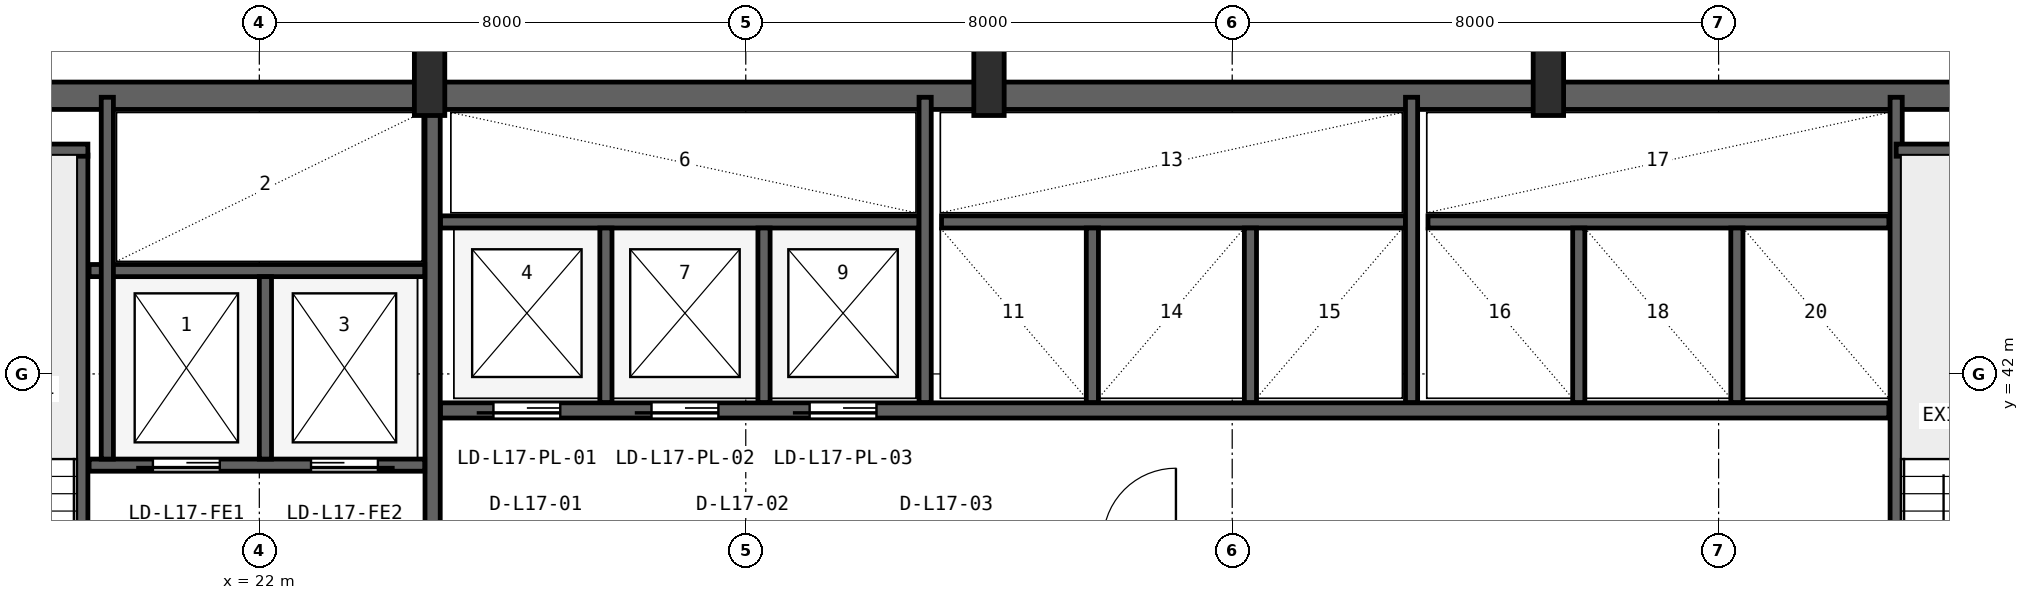
"""IFC4 building model, lengths in metres.
Left out: names, types, materials, properties, quantities, classifications, styles, units other than length and angle.
Written with IfcOpenShell. Run it as: python <this file> out.ifc"""

import sys

from ifc_helpers import new_model, si_unit, direction, frame, frame_2d, origin, origin_2d, place, context, subcontext, project, spatial, rectangle, i_section, extrude, source, transform, mapped, element, fill, save


model = new_model("IFC4")
c1 = context("Model", 3, precision=1e-05, world=origin(), true_north=direction((0.0, 1.0)))
c2 = subcontext(c1, "Body", "Model", "MODEL_VIEW")
j1 = project(units=[si_unit("LENGTHUNIT", "METRE"), si_unit("PLANEANGLEUNIT", "RADIAN")], contexts=[c1])
p1 = place(None, origin())
s1 = spatial("IfcSite", under=j1, at=p1, CompositionType="ELEMENT")
p2 = place(p1, origin())
s2 = spatial("IfcBuilding", under=s1, at=p2, CompositionType="ELEMENT")
p3 = place(p2, frame((0.0, 0.0, 74.4)))
s3 = spatial("IfcBuildingStorey", under=s2, at=p3, CompositionType="ELEMENT", Elevation=74.4)
p4 = place(p3, frame((15.6, 46.575, 0.0), z_axis=(0.0, 0.0, 1.0), x_axis=(1.0, 0.0, 0.0)))
e1 = element("IfcWall", 1, at=p4, inside=s3, PredefinedType="SHEAR", context=c2, shape_type="SweptSolid", body=[
    extrude(rectangle(XDim=36.8, YDim=0.45, at=frame_2d((18.4, 0.0))), origin(), (0.0, 0.0, 1.0), 3.65),
])
m1 = source(origin(), c2, "Body", "SweptSolid", [
    extrude(i_section(OverallWidth=0.5, OverallDepth=1.1, WebThickness=0.018, FlangeThickness=0.032, FilletRadius=0.018, at=origin_2d()), origin(), (0.0, 0.0, 1.0), 3.9),
])
for number, where, z_axis, x_axis in (
    (2, (24.8, 46.8, 0.0), (0.0, 0.0, 1.0), (1.0, 0.0, 0.0)),
    (3, (34.0, 46.8, 0.0), (0.0, 0.0, 1.0), (1.0, 0.0, 0.0)),
    (4, (43.2, 46.8, 0.0), (0.0, 0.0, 1.0), (1.0, 0.0, 0.0)),
):
    element("IfcColumn", number, at=place(p3, frame(where, z_axis=z_axis, x_axis=x_axis)), inside=s3, PredefinedType="COLUMN", context=c2, shape_type="MappedRepresentation", body=[
        mapped(m1, transform((0.0, 0.0, 0.0), x_axis=(1.0, 0.0, 0.0), y_axis=(0.0, 1.0, 0.0), z_axis=(0.0, 0.0, 1.0), scale=1.0)),
    ])
p5 = place(p3, frame((19.08, 35.95, 0.0), z_axis=(0.0, 0.0, 1.0), x_axis=(0.0, 1.0, 0.0)))
e5 = element("IfcWall", 5, at=p5, inside=s3, PredefinedType="SHEAR", context=c2, shape_type="SweptSolid", body=[
    extrude(rectangle(XDim=9.65, YDim=0.2, at=frame_2d((4.825, 0.0))), origin(), (0.0, 0.0, 1.0), 3.65),
])
p6 = place(p5, frame((0.25, 0.0, 0.0)))
e6 = element("IfcOpeningElement", 6, at=p6, cuts=e5, PredefinedType="OPENING", context=c2, shape_type="SweptSolid", body=[
    extrude(rectangle(XDim=0.95, YDim=2.1, at=frame_2d((0.475, 1.05))), frame((0.0, 0.11, 0.0), z_axis=(0.0, -1.0, 0.0), x_axis=(1.0, 0.0, 0.0)), (0.0, 0.0, 1.0), 0.22),
])
p7 = place(p3, frame((15.95, 45.68, 0.0), z_axis=(0.0, 0.0, 1.0), x_axis=(1.0, 0.0, 0.0)))
e7 = element("IfcWall", 7, at=p7, inside=s3, PredefinedType="SHEAR", context=c2, shape_type="SweptSolid", body=[
    extrude(rectangle(XDim=3.23, YDim=0.2, at=frame_2d((1.615, 0.0))), origin(), (0.0, 0.0, 1.0), 3.65),
])
p8 = place(p3, frame((24.85, 36.05, 0.0), z_axis=(0.0, 0.0, 1.0), x_axis=(0.0, 1.0, 0.0)))
e8 = element("IfcWall", 8, at=p8, inside=s3, PredefinedType="SHEAR", context=c2, shape_type="SweptSolid", body=[
    extrude(rectangle(XDim=10.45, YDim=0.25, at=frame_2d((5.225, 0.0))), origin(), (0.0, 0.0, 1.0), 3.65),
])
p9 = place(p3, frame((19.2, 40.5, 0.0), z_axis=(0.0, 0.0, 1.0), x_axis=(1.0, 0.0, 0.0)))
e9 = element("IfcWall", 9, at=p9, inside=s3, PredefinedType="SHEAR", context=c2, shape_type="SweptSolid", body=[
    extrude(rectangle(XDim=5.52, YDim=0.2, at=frame_2d((2.76, 0.0))), origin(), (0.0, 0.0, 1.0), 3.65),
])
p10 = place(p9, frame((1.05, 0.0, 0.0)))
e10 = element("IfcOpeningElement", 10, at=p10, cuts=e9, PredefinedType="OPENING", context=c2, shape_type="SweptSolid", body=[
    extrude(rectangle(XDim=1.1, YDim=2.18, at=frame_2d((0.55, 1.09))), frame((0.0, 0.11, 0.0), z_axis=(0.0, -1.0, 0.0), x_axis=(1.0, 0.0, 0.0)), (0.0, 0.0, 1.0), 0.22),
])
p11 = place(p9, frame((3.65, 0.0, 0.0)))
e11 = element("IfcOpeningElement", 11, at=p11, cuts=e9, PredefinedType="OPENING", context=c2, shape_type="SweptSolid", body=[
    extrude(rectangle(XDim=1.1, YDim=2.18, at=frame_2d((0.55, 1.09))), frame((0.0, 0.11, 0.0), z_axis=(0.0, -1.0, 0.0), x_axis=(1.0, 0.0, 0.0)), (0.0, 0.0, 1.0), 0.22),
])
p12 = place(p3, frame((19.2, 43.7, 0.0), z_axis=(0.0, 0.0, 1.0), x_axis=(1.0, 0.0, 0.0)))
e12 = element("IfcWall", 12, at=p12, inside=s3, PredefinedType="SHEAR", context=c2, shape_type="SweptSolid", body=[
    extrude(rectangle(XDim=5.52, YDim=0.2, at=frame_2d((2.76, 0.0))), origin(), (0.0, 0.0, 1.0), 3.65),
])
p13 = place(p3, frame((22.1, 40.6, 0.0), z_axis=(0.0, 0.0, 1.0), x_axis=(0.0, 1.0, 0.0)))
e13 = element("IfcWall", 13, at=p13, inside=s3, PredefinedType="SHEAR", context=c2, shape_type="SweptSolid", body=[
    extrude(rectangle(XDim=3.0, YDim=0.2, at=frame_2d((1.5, 0.0))), origin(), (0.0, 0.0, 1.0), 3.65),
])
p14 = place(p3, frame((19.5, 40.6, 0.0), z_axis=(0.0, 0.0, 1.0), x_axis=(0.0, 1.0, 0.0)))
e14 = element("IfcWall", 14, at=p14, inside=s3, PredefinedType="SHEAR", context=c2, shape_type="SweptSolid", body=[
    extrude(rectangle(XDim=5.95, YDim=0.2, at=frame_2d((2.975, 0.0))), origin(), (0.0, 0.0, 1.0), 3.65),
])
p15 = place(p3, frame((48.92, 36.05, 0.0), z_axis=(0.0, 0.0, 1.0), x_axis=(0.0, 1.0, 0.0)))
e15 = element("IfcWall", 15, at=p15, inside=s3, PredefinedType="SHEAR", context=c2, shape_type="SweptSolid", body=[
    extrude(rectangle(XDim=10.5, YDim=0.2, at=frame_2d((5.25, 0.0))), origin(), (0.0, 0.0, 1.0), 3.65),
])
p16 = place(p3, frame((48.92, 45.68, 0.0), z_axis=(0.0, 0.0, 1.0), x_axis=(1.0, 0.0, 0.0)))
e16 = element("IfcWall", 16, at=p16, inside=s3, PredefinedType="SHEAR", context=c2, shape_type="SweptSolid", body=[
    extrude(rectangle(XDim=3.18, YDim=0.2, at=frame_2d((1.59, 0.0))), origin(), (0.0, 0.0, 1.0), 3.65),
])
p17 = place(p3, frame((24.98, 41.4, 0.0), z_axis=(0.0, 0.0, 1.0), x_axis=(1.0, 0.0, 0.0)))
e17 = element("IfcWall", 17, at=p17, inside=s3, PredefinedType="SHEAR", context=c2, shape_type="SweptSolid", body=[
    extrude(rectangle(XDim=23.82, YDim=0.25, at=frame_2d((11.91, 0.0))), origin(), (0.0, 0.0, 1.0), 3.65),
])
p18 = place(p17, frame((0.87, 0.0, 0.0)))
e18 = element("IfcOpeningElement", 18, at=p18, cuts=e17, PredefinedType="OPENING", context=c2, shape_type="SweptSolid", body=[
    extrude(rectangle(XDim=1.1, YDim=2.18, at=frame_2d((0.55, 1.09))), frame((0.0, 0.135, 0.0), z_axis=(0.0, -1.0, 0.0), x_axis=(1.0, 0.0, 0.0)), (0.0, 0.0, 1.0), 0.27),
])
p19 = place(p17, frame((3.47, 0.0, 0.0)))
e19 = element("IfcOpeningElement", 19, at=p19, cuts=e17, PredefinedType="OPENING", context=c2, shape_type="SweptSolid", body=[
    extrude(rectangle(XDim=1.1, YDim=2.18, at=frame_2d((0.55, 1.09))), frame((0.0, 0.135, 0.0), z_axis=(0.0, -1.0, 0.0), x_axis=(1.0, 0.0, 0.0)), (0.0, 0.0, 1.0), 0.27),
])
p20 = place(p17, frame((6.07, 0.0, 0.0)))
e20 = element("IfcOpeningElement", 20, at=p20, cuts=e17, PredefinedType="OPENING", context=c2, shape_type="SweptSolid", body=[
    extrude(rectangle(XDim=1.1, YDim=2.18, at=frame_2d((0.55, 1.09))), frame((0.0, 0.135, 0.0), z_axis=(0.0, -1.0, 0.0), x_axis=(1.0, 0.0, 0.0)), (0.0, 0.0, 1.0), 0.27),
])
p21 = place(p3, frame((24.98, 44.5, 0.0), z_axis=(0.0, 0.0, 1.0), x_axis=(1.0, 0.0, 0.0)))
e21 = element("IfcWall", 21, at=p21, inside=s3, PredefinedType="SHEAR", context=c2, shape_type="SweptSolid", body=[
    extrude(rectangle(XDim=7.87, YDim=0.2, at=frame_2d((3.935, 0.0))), origin(), (0.0, 0.0, 1.0), 3.65),
])
for number, where, z_axis, x_axis in (
    (22, (27.7, 41.53, 0.0), (0.0, 0.0, 1.0), (0.0, 1.0, 0.0)),
    (23, (30.3, 41.53, 0.0), (0.0, 0.0, 1.0), (0.0, 1.0, 0.0)),
):
    element("IfcWall", number, at=place(p3, frame(where, z_axis=z_axis, x_axis=x_axis)), inside=s3, PredefinedType="SHEAR", context=c2, shape_type="SweptSolid", body=[
        extrude(rectangle(XDim=2.87, YDim=0.2, at=frame_2d((1.435, 0.0))), origin(), (0.0, 0.0, 1.0), 3.65),
    ])
p22 = place(p3, frame((32.95, 41.53, 0.0), z_axis=(0.0, 0.0, 1.0), x_axis=(0.0, 1.0, 0.0)))
e24 = element("IfcWall", 24, at=p22, inside=s3, PredefinedType="SHEAR", context=c2, shape_type="SweptSolid", body=[
    extrude(rectangle(XDim=5.02, YDim=0.2, at=frame_2d((2.51, 0.0))), origin(), (0.0, 0.0, 1.0), 3.65),
])
p23 = place(p3, frame((33.22, 44.5, 0.0), z_axis=(0.0, 0.0, 1.0), x_axis=(1.0, 0.0, 0.0)))
e25 = element("IfcWall", 25, at=p23, inside=s3, PredefinedType="SHEAR", context=c2, shape_type="SweptSolid", body=[
    extrude(rectangle(XDim=7.63, YDim=0.2, at=frame_2d((3.815, 0.0))), origin(), (0.0, 0.0, 1.0), 3.65),
])
for number, where, z_axis, x_axis in (
    (26, (35.7, 41.53, 0.0), (0.0, 0.0, 1.0), (0.0, 1.0, 0.0)),
    (27, (38.3, 41.53, 0.0), (0.0, 0.0, 1.0), (0.0, 1.0, 0.0)),
):
    element("IfcWall", number, at=place(p3, frame(where, z_axis=z_axis, x_axis=x_axis)), inside=s3, PredefinedType="SHEAR", context=c2, shape_type="SweptSolid", body=[
        extrude(rectangle(XDim=2.87, YDim=0.2, at=frame_2d((1.435, 0.0))), origin(), (0.0, 0.0, 1.0), 3.65),
    ])
p24 = place(p3, frame((40.95, 41.53, 0.0), z_axis=(0.0, 0.0, 1.0), x_axis=(0.0, 1.0, 0.0)))
e28 = element("IfcWall", 28, at=p24, inside=s3, PredefinedType="SHEAR", context=c2, shape_type="SweptSolid", body=[
    extrude(rectangle(XDim=5.02, YDim=0.2, at=frame_2d((2.51, 0.0))), origin(), (0.0, 0.0, 1.0), 3.65),
])
p25 = place(p3, frame((41.22, 44.5, 0.0), z_axis=(0.0, 0.0, 1.0), x_axis=(1.0, 0.0, 0.0)))
e29 = element("IfcWall", 29, at=p25, inside=s3, PredefinedType="SHEAR", context=c2, shape_type="SweptSolid", body=[
    extrude(rectangle(XDim=7.58, YDim=0.2, at=frame_2d((3.79, 0.0))), origin(), (0.0, 0.0, 1.0), 3.65),
])
for number, where, z_axis, x_axis in (
    (30, (43.7, 41.53, 0.0), (0.0, 0.0, 1.0), (0.0, 1.0, 0.0)),
    (31, (46.3, 41.53, 0.0), (0.0, 0.0, 1.0), (0.0, 1.0, 0.0)),
):
    element("IfcWall", number, at=place(p3, frame(where, z_axis=z_axis, x_axis=x_axis)), inside=s3, PredefinedType="SHEAR", context=c2, shape_type="SweptSolid", body=[
        extrude(rectangle(XDim=2.87, YDim=0.2, at=frame_2d((1.435, 0.0))), origin(), (0.0, 0.0, 1.0), 3.65),
    ])
m2 = source(origin(), c2, "Body", "SweptSolid", [
    extrude(rectangle(XDim=1.1, YDim=2.18, at=frame_2d((0.55, 1.09))), frame((0.0, 0.025, 0.0), z_axis=(0.0, -1.0, 0.0), x_axis=(1.0, 0.0, 0.0)), (0.0, 0.0, 1.0), 0.05),
])
p26 = place(p10, frame((1.1, 0.0, 0.0), z_axis=(0.0, 0.0, 1.0), x_axis=(-1.0, 0.0, 0.0)))
e32 = element("IfcDoor", 32, at=p26, inside=s3, OperationType="SLIDING_TO_LEFT", PredefinedType="DOOR", context=c2, shape_type="MappedRepresentation", body=[
    mapped(m2, transform((0.0, 0.0, 0.0), x_axis=(1.0, 0.0, 0.0), y_axis=(0.0, 1.0, 0.0), z_axis=(0.0, 0.0, 1.0), scale=1.0)),
])
fill(e10, e32)
p27 = place(p11, frame((1.1, 0.0, 0.0), z_axis=(0.0, 0.0, 1.0), x_axis=(-1.0, 0.0, 0.0)))
e33 = element("IfcDoor", 33, at=p27, inside=s3, OperationType="SLIDING_TO_RIGHT", PredefinedType="DOOR", context=c2, shape_type="MappedRepresentation", body=[
    mapped(m2, transform((0.0, 0.0, 0.0), x_axis=(1.0, 0.0, 0.0), y_axis=(0.0, 1.0, 0.0), z_axis=(0.0, 0.0, 1.0), scale=1.0)),
])
fill(e11, e33)
p28 = place(p18, frame((1.1, 0.0, 0.0), z_axis=(0.0, 0.0, 1.0), x_axis=(-1.0, 0.0, 0.0)))
e34 = element("IfcDoor", 34, at=p28, inside=s3, OperationType="SLIDING_TO_LEFT", PredefinedType="DOOR", context=c2, shape_type="MappedRepresentation", body=[
    mapped(m2, transform((0.0, 0.0, 0.0), x_axis=(1.0, 0.0, 0.0), y_axis=(0.0, 1.0, 0.0), z_axis=(0.0, 0.0, 1.0), scale=1.0)),
])
fill(e18, e34)
p29 = place(p19, frame((1.1, 0.0, 0.0), z_axis=(0.0, 0.0, 1.0), x_axis=(-1.0, 0.0, 0.0)))
e35 = element("IfcDoor", 35, at=p29, inside=s3, OperationType="SLIDING_TO_LEFT", PredefinedType="DOOR", context=c2, shape_type="MappedRepresentation", body=[
    mapped(m2, transform((0.0, 0.0, 0.0), x_axis=(1.0, 0.0, 0.0), y_axis=(0.0, 1.0, 0.0), z_axis=(0.0, 0.0, 1.0), scale=1.0)),
])
fill(e19, e35)
p30 = place(p20, frame((1.1, 0.0, 0.0), z_axis=(0.0, 0.0, 1.0), x_axis=(-1.0, 0.0, 0.0)))
e36 = element("IfcDoor", 36, at=p30, inside=s3, OperationType="SLIDING_TO_LEFT", PredefinedType="DOOR", context=c2, shape_type="MappedRepresentation", body=[
    mapped(m2, transform((0.0, 0.0, 0.0), x_axis=(1.0, 0.0, 0.0), y_axis=(0.0, 1.0, 0.0), z_axis=(0.0, 0.0, 1.0), scale=1.0)),
])
fill(e20, e36)
save(model, sys.argv[1])
